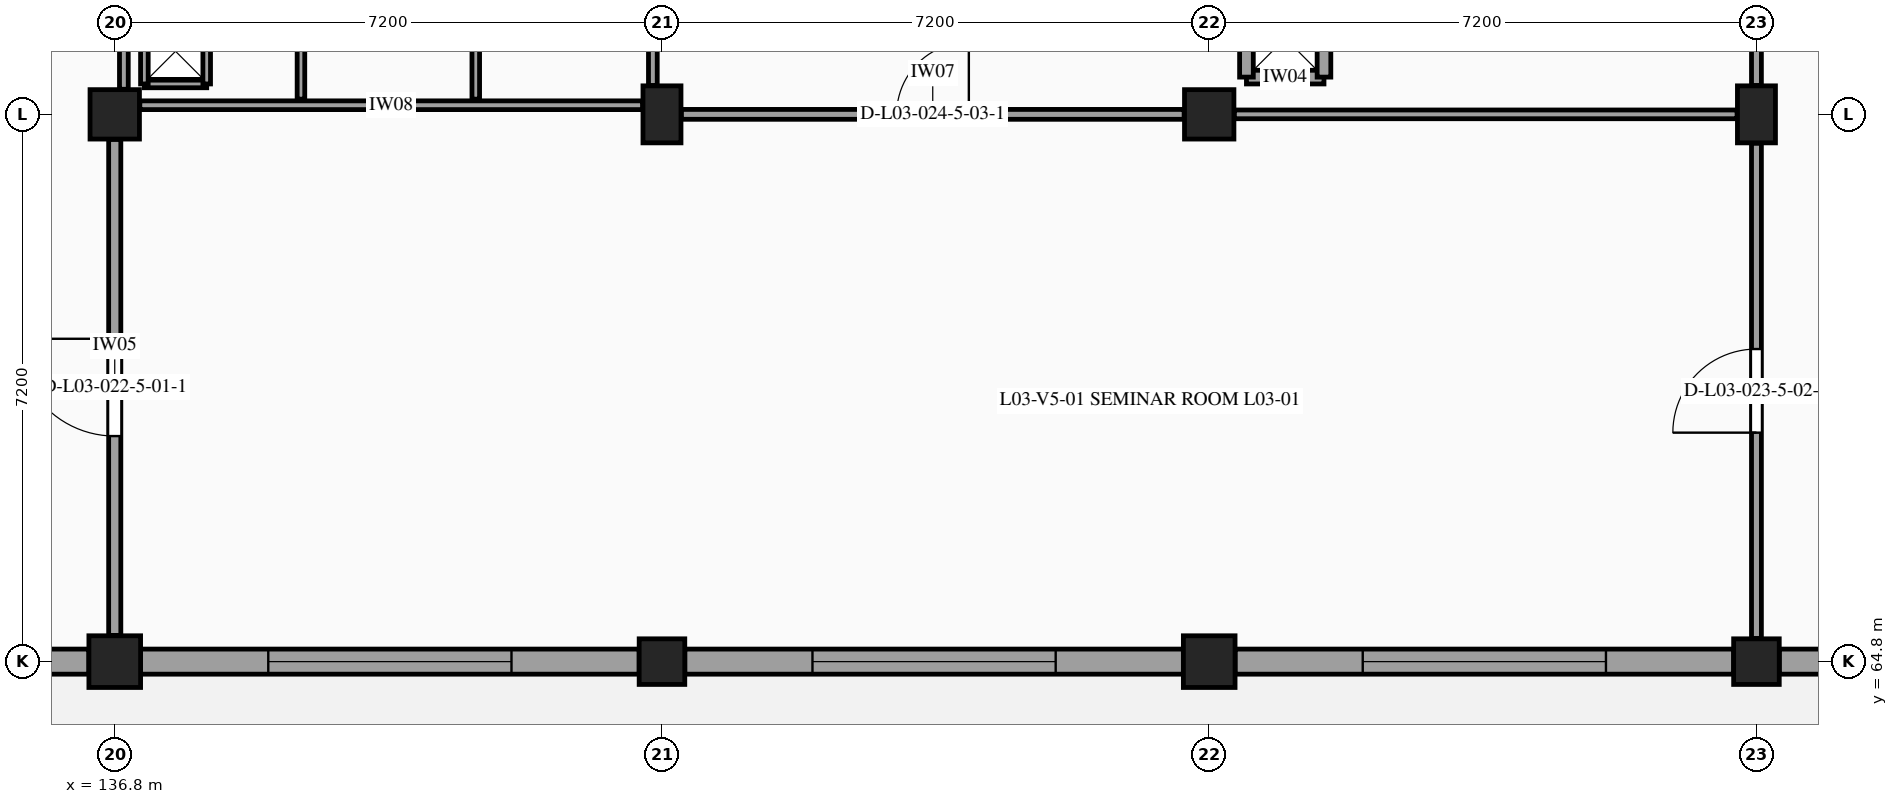
"""IFC4 building model, lengths in metres.
Left out: names, types, materials, properties, quantities, classifications, styles, units other than length and angle.
Written with IfcOpenShell. Run it as: python <this file> out.ifc"""

import sys

from ifc_helpers import new_model, si_unit, direction, frame, frame_2d, origin, origin_2d, place, context, subcontext, project, spatial, rectangle, extrude, element, fill, save


model = new_model("IFC4")
c1 = context("Model", 3, precision=1e-05, world=origin(), true_north=direction((0.0, 1.0)))
c2 = subcontext(c1, "Body", "Model", "MODEL_VIEW")
j1 = project(units=[si_unit("LENGTHUNIT", "METRE"), si_unit("PLANEANGLEUNIT", "RADIAN")], contexts=[c1])
p1 = place(None, origin())
s1 = spatial("IfcSite", under=j1, at=p1, CompositionType="ELEMENT")
p2 = place(p1, origin())
s2 = spatial("IfcBuilding", under=s1, at=p2, CompositionType="ELEMENT")
p3 = place(p2, frame((0.0, 0.0, 14.4)))
s3 = spatial("IfcBuildingStorey", under=s2, at=p3, CompositionType="ELEMENT", Elevation=14.4)
p4 = place(p3, frame((136.8, 64.8, 0.0), z_axis=(0.0, 0.0, 1.0), x_axis=(1.0, 0.0, 0.0)))
e1 = element("IfcColumn", 1, at=p4, inside=s3, PredefinedType="COLUMN", context=c2, shape_type="SweptSolid", body=[
    extrude(rectangle(XDim=0.68, YDim=0.68, at=origin_2d()), origin(), (0.0, 0.0, 1.0), 4.2),
])
p5 = place(p3, frame((136.8, 72.0, 0.0), z_axis=(0.0, 0.0, 1.0), x_axis=(1.0, 0.0, 0.0)))
e2 = element("IfcColumn", 2, at=p5, inside=s3, PredefinedType="COLUMN", context=c2, shape_type="SweptSolid", body=[
    extrude(rectangle(XDim=0.65, YDim=0.65, at=origin_2d()), origin(), (0.0, 0.0, 1.0), 4.2),
])
p6 = place(p3, frame((144.0, 64.8, 0.0), z_axis=(0.0, 0.0, 1.0), x_axis=(1.0, 0.0, 0.0)))
e3 = element("IfcColumn", 3, at=p6, inside=s3, PredefinedType="COLUMN", context=c2, shape_type="SweptSolid", body=[
    extrude(rectangle(XDim=0.6, YDim=0.6, at=origin_2d()), origin(), (0.0, 0.0, 1.0), 4.2),
])
p7 = place(p3, frame((144.0, 72.0, 0.0), z_axis=(0.0, 0.0, 1.0), x_axis=(1.0, 0.0, 0.0)))
e4 = element("IfcColumn", 4, at=p7, inside=s3, PredefinedType="COLUMN", context=c2, shape_type="SweptSolid", body=[
    extrude(rectangle(XDim=0.5, YDim=0.75, at=origin_2d()), origin(), (0.0, 0.0, 1.0), 4.2),
])
p8 = place(p3, frame((151.2, 64.8, 0.0), z_axis=(0.0, 0.0, 1.0), x_axis=(1.0, 0.0, 0.0)))
e5 = element("IfcColumn", 5, at=p8, inside=s3, PredefinedType="COLUMN", context=c2, shape_type="SweptSolid", body=[
    extrude(rectangle(XDim=0.68, YDim=0.68, at=origin_2d()), origin(), (0.0, 0.0, 1.0), 4.2),
])
p9 = place(p3, frame((151.2, 72.0, 0.0), z_axis=(0.0, 0.0, 1.0), x_axis=(1.0, 0.0, 0.0)))
e6 = element("IfcColumn", 6, at=p9, inside=s3, PredefinedType="COLUMN", context=c2, shape_type="SweptSolid", body=[
    extrude(rectangle(XDim=0.65, YDim=0.65, at=origin_2d()), origin(), (0.0, 0.0, 1.0), 4.2),
])
p10 = place(p3, frame((158.4, 64.8, 0.0), z_axis=(0.0, 0.0, 1.0), x_axis=(1.0, 0.0, 0.0)))
e7 = element("IfcColumn", 7, at=p10, inside=s3, PredefinedType="COLUMN", context=c2, shape_type="SweptSolid", body=[
    extrude(rectangle(XDim=0.6, YDim=0.6, at=origin_2d()), origin(), (0.0, 0.0, 1.0), 4.2),
])
p11 = place(p3, frame((158.4, 72.0, 0.0), z_axis=(0.0, 0.0, 1.0), x_axis=(1.0, 0.0, 0.0)))
e8 = element("IfcColumn", 8, at=p11, inside=s3, PredefinedType="COLUMN", context=c2, shape_type="SweptSolid", body=[
    extrude(rectangle(XDim=0.5, YDim=0.75, at=origin_2d()), origin(), (0.0, 0.0, 1.0), 4.2),
])
p12 = place(p3, frame((165.26, 64.8, 0.0), z_axis=(0.0, 0.0, 1.0), x_axis=(-1.0, 0.0, 0.0)))
e9 = element("IfcWall", 9, at=p12, inside=s3, PredefinedType="STANDARD", context=c2, shape_type="SweptSolid", body=[
    extrude(rectangle(XDim=6.56, YDim=0.33, at=frame_2d((3.28, 0.0))), origin(), (0.0, 0.0, 1.0), 3.16),
])
p13 = place(p12, frame((2.73, 0.0, 0.0)))
e10 = element("IfcOpeningElement", 10, at=p13, cuts=e9, PredefinedType="OPENING", context=c2, shape_type="SweptSolid", body=[
    extrude(rectangle(XDim=1.1, YDim=2.2, at=frame_2d((0.55, 1.1))), frame((0.0, 0.175, 0.0), z_axis=(0.0, -1.0, 0.0), x_axis=(1.0, 0.0, 0.0)), (0.0, 0.0, 1.0), 0.35),
])
p14 = place(p3, frame((158.1, 64.8, 0.0), z_axis=(0.0, 0.0, 1.0), x_axis=(-1.0, 0.0, 0.0)))
e11 = element("IfcWall", 11, at=p14, inside=s3, PredefinedType="STANDARD", context=c2, shape_type="SweptSolid", body=[
    extrude(rectangle(XDim=6.56, YDim=0.33, at=frame_2d((3.28, 0.0))), origin(), (0.0, 0.0, 1.0), 3.16),
])
p15 = place(p14, frame((1.68, 0.0, 0.95)))
e12 = element("IfcOpeningElement", 12, at=p15, cuts=e11, PredefinedType="OPENING", context=c2, shape_type="SweptSolid", body=[
    extrude(rectangle(XDim=3.2, YDim=1.45, at=frame_2d((1.6, 0.725))), frame((0.0, 0.175, 0.0), z_axis=(0.0, -1.0, 0.0), x_axis=(1.0, 0.0, 0.0)), (0.0, 0.0, 1.0), 0.35),
])
p16 = place(p3, frame((150.86, 64.8, 0.0), z_axis=(0.0, 0.0, 1.0), x_axis=(-1.0, 0.0, 0.0)))
e13 = element("IfcWall", 13, at=p16, inside=s3, PredefinedType="STANDARD", context=c2, shape_type="SweptSolid", body=[
    extrude(rectangle(XDim=6.56, YDim=0.33, at=frame_2d((3.28, 0.0))), origin(), (0.0, 0.0, 1.0), 3.16),
])
p17 = place(p16, frame((1.68, 0.0, 0.95)))
e14 = element("IfcOpeningElement", 14, at=p17, cuts=e13, PredefinedType="OPENING", context=c2, shape_type="SweptSolid", body=[
    extrude(rectangle(XDim=3.2, YDim=1.45, at=frame_2d((1.6, 0.725))), frame((0.0, 0.175, 0.0), z_axis=(0.0, -1.0, 0.0), x_axis=(1.0, 0.0, 0.0)), (0.0, 0.0, 1.0), 0.35),
])
p18 = place(p3, frame((143.7, 64.8, 0.0), z_axis=(0.0, 0.0, 1.0), x_axis=(-1.0, 0.0, 0.0)))
e15 = element("IfcWall", 15, at=p18, inside=s3, PredefinedType="STANDARD", context=c2, shape_type="SweptSolid", body=[
    extrude(rectangle(XDim=6.56, YDim=0.33, at=frame_2d((3.28, 0.0))), origin(), (0.0, 0.0, 1.0), 3.16),
])
p19 = place(p18, frame((1.68, 0.0, 0.95)))
e16 = element("IfcOpeningElement", 16, at=p19, cuts=e15, PredefinedType="OPENING", context=c2, shape_type="SweptSolid", body=[
    extrude(rectangle(XDim=3.2, YDim=1.45, at=frame_2d((1.6, 0.725))), frame((0.0, 0.175, 0.0), z_axis=(0.0, -1.0, 0.0), x_axis=(1.0, 0.0, 0.0)), (0.0, 0.0, 1.0), 0.35),
])
p20 = place(p3, frame((136.46, 64.8, 0.0), z_axis=(0.0, 0.0, 1.0), x_axis=(-1.0, 0.0, 0.0)))
e17 = element("IfcWall", 17, at=p20, inside=s3, PredefinedType="STANDARD", context=c2, shape_type="SweptSolid", body=[
    extrude(rectangle(XDim=6.56, YDim=0.33, at=frame_2d((3.28, 0.0))), origin(), (0.0, 0.0, 1.0), 3.94),
])
p21 = place(p20, frame((1.68, 0.0, 0.95)))
e18 = element("IfcOpeningElement", 18, at=p21, cuts=e17, PredefinedType="OPENING", context=c2, shape_type="SweptSolid", body=[
    extrude(rectangle(XDim=3.2, YDim=1.45, at=frame_2d((1.6, 0.725))), frame((0.0, 0.175, 0.0), z_axis=(0.0, -1.0, 0.0), x_axis=(1.0, 0.0, 0.0)), (0.0, 0.0, 1.0), 0.35),
])
p22 = place(p3, frame((137.13, 72.12, 0.0), z_axis=(0.0, 0.0, 1.0), x_axis=(1.0, 0.0, 0.0)))
e19 = element("IfcWall", 19, at=p22, inside=s3, PredefinedType="PARTITIONING", context=c2, shape_type="SweptSolid", body=[
    extrude(rectangle(XDim=6.615, YDim=0.115, at=frame_2d((3.308, 0.0))), origin(), (0.0, 0.0, 1.0), 3.175),
])
p23 = place(p3, frame((136.92, 72.33, 0.0), z_axis=(0.0, 0.0, 1.0), x_axis=(0.0, 1.0, 0.0)))
e20 = element("IfcWall", 20, at=p23, inside=s3, PredefinedType="PARTITIONING", context=c2, shape_type="SweptSolid", body=[
    extrude(rectangle(XDim=6.555, YDim=0.115, at=frame_2d((3.277, 0.0))), origin(), (0.0, 0.0, 1.0), 3.285),
])
p24 = place(p3, frame((143.88, 72.38, 0.0), z_axis=(0.0, 0.0, 1.0), x_axis=(0.0, 1.0, 0.0)))
e21 = element("IfcWall", 21, at=p24, inside=s3, PredefinedType="PARTITIONING", context=c2, shape_type="SweptSolid", body=[
    extrude(rectangle(XDim=6.495, YDim=0.115, at=frame_2d((3.248, 0.0))), origin(), (0.0, 0.0, 1.0), 3.31),
])
for number, where, z_axis, x_axis in (
    (22, (139.25, 72.2, 0.0), (0.0, 0.0, 1.0), (0.0, 1.0, 0.0)),
    (23, (141.55, 72.2, 0.0), (0.0, 0.0, 1.0), (0.0, 1.0, 0.0)),
):
    element("IfcWall", number, at=place(p3, frame(where, z_axis=z_axis, x_axis=x_axis)), inside=s3, PredefinedType="PARTITIONING", context=c2, shape_type="SweptSolid", body=[
        extrude(rectangle(XDim=6.8, YDim=0.1, at=frame_2d((3.4, 0.0))), origin(), (0.0, 0.0, 1.0), 3.94),
    ])
for number, where, z_axis, x_axis in (
    (24, (151.69, 72.49, 0.0), (0.0, 0.0, 1.0), (1.0, 0.0, 0.0)),
    (25, (152.71, 72.49, 0.0), (0.0, 0.0, 1.0), (0.0, 1.0, 0.0)),
    (26, (151.69, 73.51, 0.0), (0.0, 0.0, 1.0), (0.0, -1.0, 0.0)),
):
    element("IfcWall", number, at=place(p3, frame(where, z_axis=z_axis, x_axis=x_axis)), inside=s3, PredefinedType="PARTITIONING", context=c2, shape_type="SweptSolid", body=[
        extrude(rectangle(XDim=1.02, YDim=0.18, at=frame_2d((0.51, 0.0))), origin(), (0.0, 0.0, 1.0), 3.94),
    ])
p25 = place(p3, frame((137.19, 72.4, 0.0), z_axis=(0.0, 0.0, 1.0), x_axis=(1.0, 0.0, 0.0)))
e27 = element("IfcWall", 27, at=p25, inside=s3, PredefinedType="PARTITIONING", context=c2, shape_type="SweptSolid", body=[
    extrude(rectangle(XDim=0.82, YDim=0.1, at=frame_2d((0.41, 0.0))), origin(), (0.0, 0.0, 1.0), 3.94),
])
for number, where, z_axis, x_axis in (
    (28, (138.01, 72.4, 0.0), (0.0, 0.0, 1.0), (0.0, 1.0, 0.0)),
    (29, (137.19, 73.26, 0.0), (0.0, 0.0, 1.0), (0.0, -1.0, 0.0)),
):
    element("IfcWall", number, at=place(p3, frame(where, z_axis=z_axis, x_axis=x_axis)), inside=s3, PredefinedType="PARTITIONING", context=c2, shape_type="SweptSolid", body=[
        extrude(rectangle(XDim=0.86, YDim=0.1, at=frame_2d((0.43, 0.0))), origin(), (0.0, 0.0, 1.0), 3.94),
    ])
p26 = place(p3, frame((136.8, 65.145, 0.0), z_axis=(0.0, 0.0, 1.0), x_axis=(0.0, 1.0, 0.0)))
e30 = element("IfcWall", 30, at=p26, inside=s3, PredefinedType="PARTITIONING", context=c2, shape_type="SweptSolid", body=[
    extrude(rectangle(XDim=6.525, YDim=0.16, at=frame_2d((3.262, 0.0))), origin(), (0.0, 0.0, 1.0), 3.11),
])
p27 = place(p26, frame((2.623, 0.0, 0.0)))
e31 = element("IfcOpeningElement", 31, at=p27, cuts=e30, PredefinedType="OPENING", context=c2, shape_type="SweptSolid", body=[
    extrude(rectangle(XDim=1.28, YDim=2.24, at=frame_2d((0.64, 1.12))), frame((0.0, 0.09, 0.0), z_axis=(0.0, -1.0, 0.0), x_axis=(1.0, 0.0, 0.0)), (0.0, 0.0, 1.0), 0.18),
])
p28 = place(p3, frame((144.255, 72.0, 0.0), z_axis=(0.0, 0.0, 1.0), x_axis=(1.0, 0.0, 0.0)))
e32 = element("IfcWall", 32, at=p28, inside=s3, PredefinedType="PARTITIONING", context=c2, shape_type="SweptSolid", body=[
    extrude(rectangle(XDim=6.615, YDim=0.13, at=frame_2d((3.308, 0.0))), origin(), (0.0, 0.0, 1.0), 3.19),
])
p29 = place(p28, frame((2.833, 0.0, 0.0)))
e33 = element("IfcOpeningElement", 33, at=p29, cuts=e32, PredefinedType="OPENING", context=c2, shape_type="SweptSolid", body=[
    extrude(rectangle(XDim=0.95, YDim=2.15, at=frame_2d((0.475, 1.075))), frame((0.0, 0.075, 0.0), z_axis=(0.0, -1.0, 0.0), x_axis=(1.0, 0.0, 0.0)), (0.0, 0.0, 1.0), 0.15),
])
p30 = place(p3, frame((158.4, 65.105, 0.0), z_axis=(0.0, 0.0, 1.0), x_axis=(0.0, 1.0, 0.0)))
e34 = element("IfcWall", 34, at=p30, inside=s3, PredefinedType="PARTITIONING", context=c2, shape_type="SweptSolid", body=[
    extrude(rectangle(XDim=6.515, YDim=0.13, at=frame_2d((3.258, 0.0))), origin(), (0.0, 0.0, 1.0), 3.22),
])
p31 = place(p30, frame((2.708, 0.0, 0.0)))
e35 = element("IfcOpeningElement", 35, at=p31, cuts=e34, PredefinedType="OPENING", context=c2, shape_type="SweptSolid", body=[
    extrude(rectangle(XDim=1.1, YDim=2.15, at=frame_2d((0.55, 1.075))), frame((0.0, 0.075, 0.0), z_axis=(0.0, -1.0, 0.0), x_axis=(1.0, 0.0, 0.0)), (0.0, 0.0, 1.0), 0.15),
])
p32 = place(p3, frame((151.53, 72.0, 0.0), z_axis=(0.0, 0.0, 1.0), x_axis=(1.0, 0.0, 0.0)))
e36 = element("IfcWall", 36, at=p32, inside=s3, PredefinedType="PARTITIONING", context=c2, shape_type="SweptSolid", body=[
    extrude(rectangle(XDim=6.615, YDim=0.115, at=frame_2d((3.308, 0.0))), origin(), (0.0, 0.0, 1.0), 3.195),
])
p33 = place(p3, frame((158.4, 72.38, 0.0), z_axis=(0.0, 0.0, 1.0), x_axis=(0.0, 1.0, 0.0)))
e37 = element("IfcWall", 37, at=p33, inside=s3, PredefinedType="PARTITIONING", context=c2, shape_type="SweptSolid", body=[
    extrude(rectangle(XDim=6.495, YDim=0.13, at=frame_2d((3.248, 0.0))), origin(), (0.0, 0.0, 1.0), 3.31),
])
p34 = place(p15, origin())
e38 = element("IfcWindow", 38, at=p34, inside=s3, PartitioningType="SINGLE_PANEL", PredefinedType="WINDOW", context=c2, shape_type="SweptSolid", body=[
    extrude(rectangle(XDim=3.2, YDim=1.45, at=frame_2d((1.6, 0.725))), frame((0.0, 0.03, 0.0), z_axis=(0.0, -1.0, 0.0), x_axis=(1.0, 0.0, 0.0)), (0.0, 0.0, 1.0), 0.06),
])
fill(e12, e38)
p35 = place(p17, origin())
e39 = element("IfcWindow", 39, at=p35, inside=s3, PartitioningType="SINGLE_PANEL", PredefinedType="WINDOW", context=c2, shape_type="SweptSolid", body=[
    extrude(rectangle(XDim=3.2, YDim=1.45, at=frame_2d((1.6, 0.725))), frame((0.0, 0.03, 0.0), z_axis=(0.0, -1.0, 0.0), x_axis=(1.0, 0.0, 0.0)), (0.0, 0.0, 1.0), 0.06),
])
fill(e14, e39)
p36 = place(p19, origin())
e40 = element("IfcWindow", 40, at=p36, inside=s3, PartitioningType="SINGLE_PANEL", PredefinedType="WINDOW", context=c2, shape_type="SweptSolid", body=[
    extrude(rectangle(XDim=3.2, YDim=1.45, at=frame_2d((1.6, 0.725))), frame((0.0, 0.03, 0.0), z_axis=(0.0, -1.0, 0.0), x_axis=(1.0, 0.0, 0.0)), (0.0, 0.0, 1.0), 0.06),
])
fill(e16, e40)
p37 = place(p27, origin())
e41 = element("IfcDoor", 41, at=p37, inside=s3, OperationType="SINGLE_SWING_RIGHT", PredefinedType="DOOR", context=c2, shape_type="SweptSolid", body=[
    extrude(rectangle(XDim=1.28, YDim=2.24, at=frame_2d((0.64, 1.12))), frame((0.0, 0.025, 0.0), z_axis=(0.0, -1.0, 0.0), x_axis=(1.0, 0.0, 0.0)), (0.0, 0.0, 1.0), 0.05),
])
fill(e31, e41)
p38 = place(p31, origin())
e42 = element("IfcDoor", 42, at=p38, inside=s3, OperationType="SINGLE_SWING_LEFT", PredefinedType="DOOR", context=c2, shape_type="SweptSolid", body=[
    extrude(rectangle(XDim=1.1, YDim=2.15, at=frame_2d((0.55, 1.075))), frame((0.0, 0.025, 0.0), z_axis=(0.0, -1.0, 0.0), x_axis=(1.0, 0.0, 0.0)), (0.0, 0.0, 1.0), 0.05),
])
fill(e35, e42)
p39 = place(p29, origin())
e43 = element("IfcDoor", 43, at=p39, inside=s3, OperationType="SINGLE_SWING_RIGHT", PredefinedType="DOOR", context=c2, shape_type="SweptSolid", body=[
    extrude(rectangle(XDim=0.95, YDim=2.15, at=frame_2d((0.475, 1.075))), frame((0.0, 0.025, 0.0), z_axis=(0.0, -1.0, 0.0), x_axis=(1.0, 0.0, 0.0)), (0.0, 0.0, 1.0), 0.05),
])
fill(e33, e43)
save(model, sys.argv[1])
